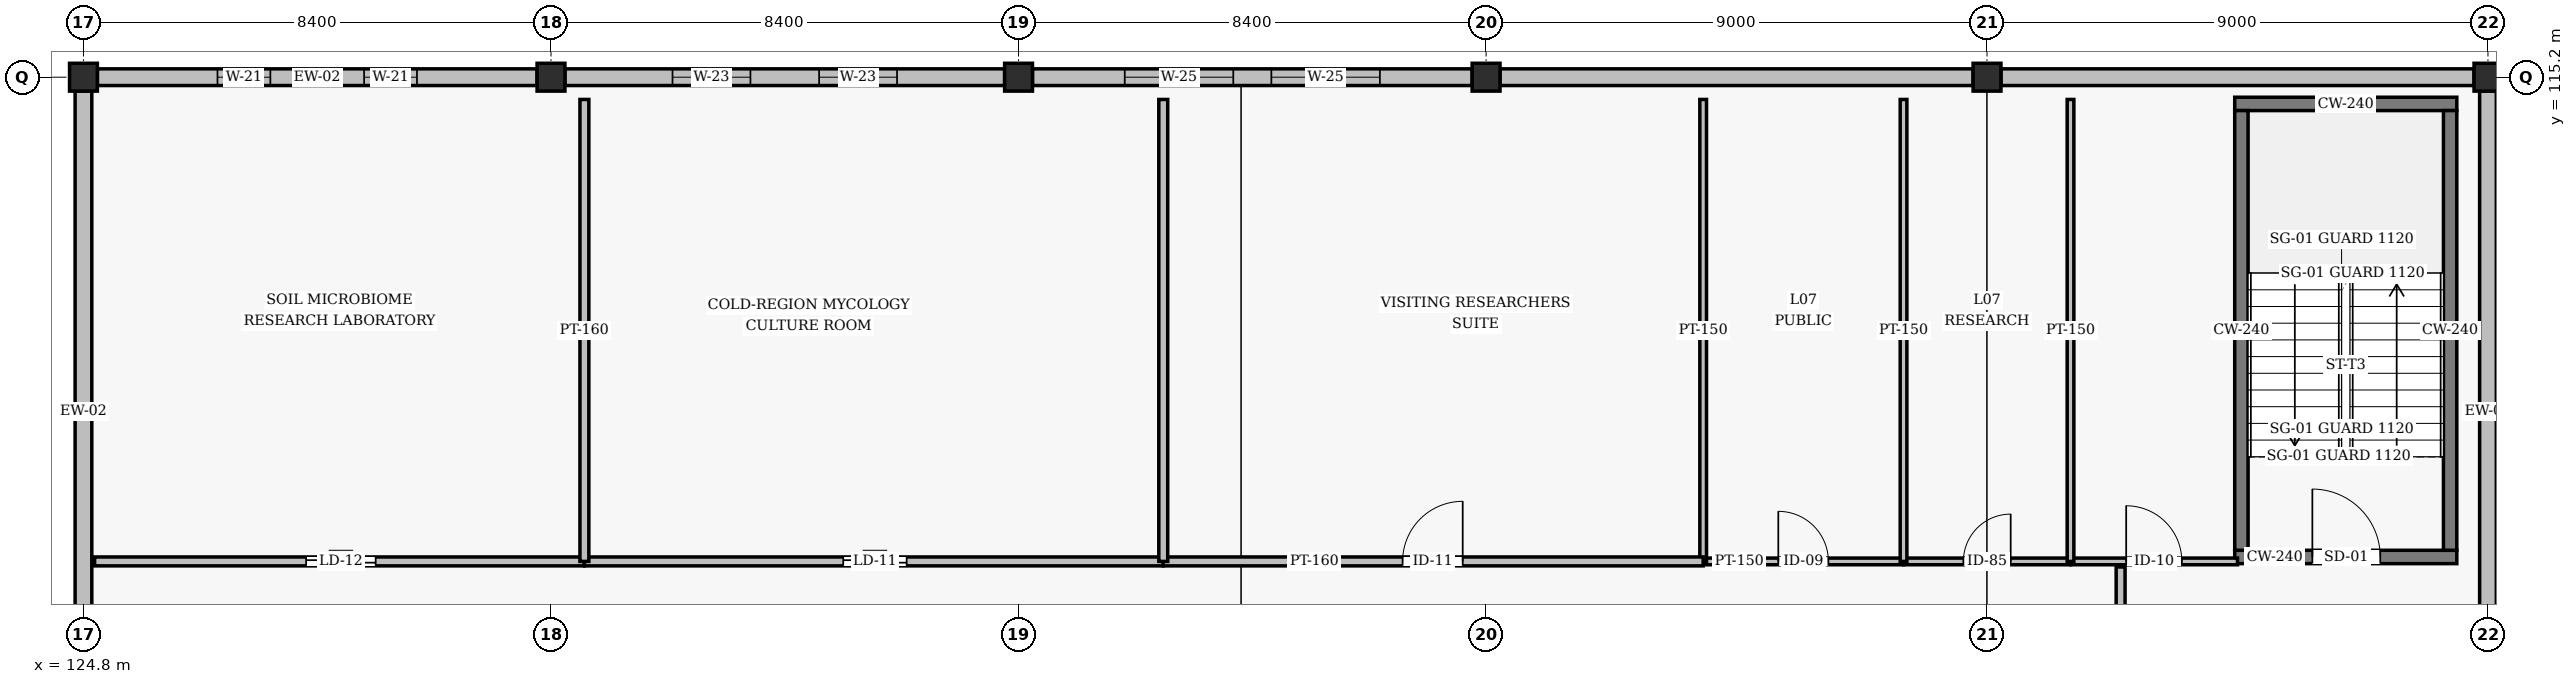
"""IFC4 building model, lengths in metres.
Left out: names, types, materials, properties, quantities, classifications, styles, units other than length and angle.
Written with IfcOpenShell. Run it as: python <this file> out.ifc"""

import sys

from ifc_helpers import new_model, si_unit, direction, frame, frame_2d, origin, origin_2d, place, context, subcontext, project, spatial, rectangle, hollow_rectangle, extrude, element, fill, save


model = new_model("IFC4")
c1 = context("Model", 3, precision=1e-05, world=origin(), true_north=direction((0.0, 1.0)))
c2 = subcontext(c1, "Body", "Model", "MODEL_VIEW")
j1 = project(units=[si_unit("LENGTHUNIT", "METRE"), si_unit("PLANEANGLEUNIT", "RADIAN")], contexts=[c1])
p1 = place(None, origin())
s1 = spatial("IfcSite", under=j1, at=p1, CompositionType="ELEMENT")
p2 = place(p1, origin())
s2 = spatial("IfcBuilding", under=s1, at=p2, CompositionType="ELEMENT")
p3 = place(p2, frame((0.0, 0.0, 28.2)))
s3 = spatial("IfcBuildingStorey", under=s2, at=p3, CompositionType="ELEMENT", Elevation=28.2)
for number, where, z_axis, x_axis in (
    (1, (124.8, 115.2, 0.0), (0.0, 0.0, 1.0), (1.0, 0.0, 0.0)),
    (2, (133.2, 115.2, 0.0), (0.0, 0.0, 1.0), (1.0, 0.0, 0.0)),
    (3, (141.6, 115.2, 0.0), (0.0, 0.0, 1.0), (1.0, 0.0, 0.0)),
    (4, (150.0, 115.2, 0.0), (0.0, 0.0, 1.0), (1.0, 0.0, 0.0)),
    (5, (159.0, 115.2, 0.0), (0.0, 0.0, 1.0), (1.0, 0.0, 0.0)),
    (6, (168.0, 115.2, 0.0), (0.0, 0.0, 1.0), (1.0, 0.0, 0.0)),
):
    element("IfcColumn", number, at=place(p3, frame(where, z_axis=z_axis, x_axis=x_axis)), inside=s3, PredefinedType="COLUMN", context=c2, shape_type="SweptSolid", body=[
        extrude(hollow_rectangle(XDim=0.5, YDim=0.5, WallThickness=0.02, InnerFilletRadius=0.02, OuterFilletRadius=0.04, at=origin_2d()), origin(), (0.0, 0.0, 1.0), 3.6),
    ])
p4 = place(p3, frame((168.0, 103.45, 0.0), z_axis=(0.0, 0.0, 1.0), x_axis=(0.0, 1.0, 0.0)))
e7 = element("IfcWall", 7, at=p4, inside=s3, PredefinedType="SOLIDWALL", context=c2, shape_type="SweptSolid", body=[
    extrude(rectangle(XDim=11.5, YDim=0.3, at=frame_2d((5.75, 0.0))), origin(), (0.0, 0.0, 1.0), 2.56),
])
for number, where, z_axis, x_axis in (
    (8, (167.75, 115.2, 0.0), (0.0, 0.0, 1.0), (-1.0, 0.0, 0.0)),
    (9, (158.75, 115.2, 0.0), (0.0, 0.0, 1.0), (-1.0, 0.0, 0.0)),
):
    element("IfcWall", number, at=place(p3, frame(where, z_axis=z_axis, x_axis=x_axis)), inside=s3, PredefinedType="SOLIDWALL", context=c2, shape_type="SweptSolid", body=[
        extrude(rectangle(XDim=8.5, YDim=0.3, at=frame_2d((4.25, 0.0))), origin(), (0.0, 0.0, 1.0), 2.56),
    ])
p5 = place(p3, frame((149.75, 115.2, 0.0), z_axis=(0.0, 0.0, 1.0), x_axis=(-1.0, 0.0, 0.0)))
e10 = element("IfcWall", 10, at=p5, inside=s3, PredefinedType="SOLIDWALL", context=c2, shape_type="SweptSolid", body=[
    extrude(rectangle(XDim=7.9, YDim=0.3, at=frame_2d((3.95, 0.0))), origin(), (0.0, 0.0, 1.0), 2.852),
])
p6 = place(p5, frame((1.658, 0.0, 0.8)))
e11 = element("IfcOpeningElement", 11, at=p6, cuts=e10, PredefinedType="OPENING", context=c2, shape_type="SweptSolid", body=[
    extrude(rectangle(XDim=1.95, YDim=1.75, at=frame_2d((0.975, 0.875))), frame((0.0, 0.16, 0.0), z_axis=(0.0, -1.0, 0.0), x_axis=(1.0, 0.0, 0.0)), (0.0, 0.0, 1.0), 0.32),
])
p7 = place(p5, frame((4.292, 0.0, 0.8)))
e12 = element("IfcOpeningElement", 12, at=p7, cuts=e10, PredefinedType="OPENING", context=c2, shape_type="SweptSolid", body=[
    extrude(rectangle(XDim=1.95, YDim=1.75, at=frame_2d((0.975, 0.875))), frame((0.0, 0.16, 0.0), z_axis=(0.0, -1.0, 0.0), x_axis=(1.0, 0.0, 0.0)), (0.0, 0.0, 1.0), 0.32),
])
p8 = place(p3, frame((141.35, 115.2, 0.0), z_axis=(0.0, 0.0, 1.0), x_axis=(-1.0, 0.0, 0.0)))
e13 = element("IfcWall", 13, at=p8, inside=s3, PredefinedType="SOLIDWALL", context=c2, shape_type="SweptSolid", body=[
    extrude(rectangle(XDim=7.9, YDim=0.3, at=frame_2d((3.95, 0.0))), origin(), (0.0, 0.0, 1.0), 2.852),
])
p9 = place(p8, frame((1.933, 0.0, 0.85)))
e14 = element("IfcOpeningElement", 14, at=p9, cuts=e13, PredefinedType="OPENING", context=c2, shape_type="SweptSolid", body=[
    extrude(rectangle(XDim=1.4, YDim=1.7, at=frame_2d((0.7, 0.85))), frame((0.0, 0.16, 0.0), z_axis=(0.0, -1.0, 0.0), x_axis=(1.0, 0.0, 0.0)), (0.0, 0.0, 1.0), 0.32),
])
p10 = place(p8, frame((4.567, 0.0, 0.85)))
e15 = element("IfcOpeningElement", 15, at=p10, cuts=e13, PredefinedType="OPENING", context=c2, shape_type="SweptSolid", body=[
    extrude(rectangle(XDim=1.4, YDim=1.7, at=frame_2d((0.7, 0.85))), frame((0.0, 0.16, 0.0), z_axis=(0.0, -1.0, 0.0), x_axis=(1.0, 0.0, 0.0)), (0.0, 0.0, 1.0), 0.32),
])
p11 = place(p3, frame((132.95, 115.2, 0.0), z_axis=(0.0, 0.0, 1.0), x_axis=(-1.0, 0.0, 0.0)))
e16 = element("IfcWall", 16, at=p11, inside=s3, PredefinedType="SOLIDWALL", context=c2, shape_type="SweptSolid", body=[
    extrude(rectangle(XDim=7.9, YDim=0.3, at=frame_2d((3.95, 0.0))), origin(), (0.0, 0.0, 1.0), 2.852),
])
p12 = place(p11, frame((2.158, 0.0, 0.95)))
e17 = element("IfcOpeningElement", 17, at=p12, cuts=e16, PredefinedType="OPENING", context=c2, shape_type="SweptSolid", body=[
    extrude(rectangle(XDim=0.95, YDim=1.6, at=frame_2d((0.475, 0.8))), frame((0.0, 0.16, 0.0), z_axis=(0.0, -1.0, 0.0), x_axis=(1.0, 0.0, 0.0)), (0.0, 0.0, 1.0), 0.32),
])
p13 = place(p11, frame((4.792, 0.0, 0.95)))
e18 = element("IfcOpeningElement", 18, at=p13, cuts=e16, PredefinedType="OPENING", context=c2, shape_type="SweptSolid", body=[
    extrude(rectangle(XDim=0.95, YDim=1.6, at=frame_2d((0.475, 0.8))), frame((0.0, 0.16, 0.0), z_axis=(0.0, -1.0, 0.0), x_axis=(1.0, 0.0, 0.0)), (0.0, 0.0, 1.0), 0.32),
])
p14 = place(p3, frame((124.8, 114.95, 0.0), z_axis=(0.0, 0.0, 1.0), x_axis=(0.0, -1.0, 0.0)))
e19 = element("IfcWall", 19, at=p14, inside=s3, PredefinedType="SOLIDWALL", context=c2, shape_type="SweptSolid", body=[
    extrude(rectangle(XDim=11.5, YDim=0.3, at=frame_2d((5.75, 0.0))), origin(), (0.0, 0.0, 1.0), 2.56),
])
p15 = place(p3, frame((163.45, 106.58, 0.0), z_axis=(0.0, 0.0, 1.0), x_axis=(1.0, 0.0, 0.0)))
e20 = element("IfcWall", 20, at=p15, inside=s3, PredefinedType="SHEAR", context=c2, shape_type="SweptSolid", body=[
    extrude(rectangle(XDim=3.99, YDim=0.24, at=frame_2d((1.995, 0.0))), origin(), (0.0, 0.0, 1.0), 3.352),
])
p16 = place(p15, frame((1.395, 0.0, 0.0)))
e21 = element("IfcOpeningElement", 21, at=p16, cuts=e20, PredefinedType="OPENING", context=c2, shape_type="SweptSolid", body=[
    extrude(rectangle(XDim=1.22, YDim=2.18, at=frame_2d((0.61, 1.09))), frame((0.0, 0.13, 0.0), z_axis=(0.0, -1.0, 0.0), x_axis=(1.0, 0.0, 0.0)), (0.0, 0.0, 1.0), 0.26),
])
p17 = place(p3, frame((163.45, 114.72, 0.0), z_axis=(0.0, 0.0, 1.0), x_axis=(1.0, 0.0, 0.0)))
e22 = element("IfcWall", 22, at=p17, inside=s3, PredefinedType="SHEAR", context=c2, shape_type="SweptSolid", body=[
    extrude(rectangle(XDim=3.99, YDim=0.24, at=frame_2d((1.995, 0.0))), origin(), (0.0, 0.0, 1.0), 3.352),
])
for number, where, z_axis, x_axis in (
    (23, (163.57, 106.7, 0.0), (0.0, 0.0, 1.0), (0.0, 1.0, 0.0)),
    (24, (167.32, 106.7, 0.0), (0.0, 0.0, 1.0), (0.0, 1.0, 0.0)),
):
    element("IfcWall", number, at=place(p3, frame(where, z_axis=z_axis, x_axis=x_axis)), inside=s3, PredefinedType="SHEAR", context=c2, shape_type="SweptSolid", body=[
        extrude(rectangle(XDim=7.9, YDim=0.24, at=frame_2d((3.95, 0.0))), origin(), (0.0, 0.0, 1.0), 3.352),
    ])
p18 = place(p3, frame((153.9, 106.5, 0.0), z_axis=(0.0, 0.0, 1.0), x_axis=(1.0, 0.0, 0.0)))
e25 = element("IfcWall", 25, at=p18, inside=s3, PredefinedType="PARTITIONING", context=c2, shape_type="SweptSolid", body=[
    extrude(rectangle(XDim=3.6, YDim=0.12, at=frame_2d((1.8, 0.0))), origin(), (0.0, 0.0, 1.0), 3.352),
])
p19 = place(p18, frame((1.35, 0.0, 0.0)))
e26 = element("IfcOpeningElement", 26, at=p19, cuts=e25, PredefinedType="OPENING", context=c2, shape_type="SweptSolid", body=[
    extrude(rectangle(XDim=0.9, YDim=2.1, at=frame_2d((0.45, 1.05))), frame((0.0, 0.07, 0.0), z_axis=(0.0, -1.0, 0.0), x_axis=(1.0, 0.0, 0.0)), (0.0, 0.0, 1.0), 0.14),
])
p20 = place(p3, frame((157.5, 106.5, 0.0), z_axis=(0.0, 0.0, 1.0), x_axis=(1.0, 0.0, 0.0)))
e27 = element("IfcWall", 27, at=p20, inside=s3, PredefinedType="PARTITIONING", context=c2, shape_type="SweptSolid", body=[
    extrude(rectangle(XDim=3.0, YDim=0.12, at=frame_2d((1.5, 0.0))), origin(), (0.0, 0.0, 1.0), 2.652),
])
p21 = place(p20, frame((1.075, 0.0, 0.0)))
e28 = element("IfcOpeningElement", 28, at=p21, cuts=e27, PredefinedType="OPENING", context=c2, shape_type="SweptSolid", body=[
    extrude(rectangle(XDim=0.85, YDim=2.1, at=frame_2d((0.425, 1.05))), frame((0.0, 0.07, 0.0), z_axis=(0.0, -1.0, 0.0), x_axis=(1.0, 0.0, 0.0)), (0.0, 0.0, 1.0), 0.14),
])
p22 = place(p3, frame((160.5, 106.5, 0.0), z_axis=(0.0, 0.0, 1.0), x_axis=(1.0, 0.0, 0.0)))
e29 = element("IfcWall", 29, at=p22, inside=s3, PredefinedType="PARTITIONING", context=c2, shape_type="SweptSolid", body=[
    extrude(rectangle(XDim=3.0, YDim=0.12, at=frame_2d((1.5, 0.0))), origin(), (0.0, 0.0, 1.0), 3.352),
])
p23 = place(p22, frame((1.0, 0.0, 0.0)))
e30 = element("IfcOpeningElement", 30, at=p23, cuts=e29, PredefinedType="OPENING", context=c2, shape_type="SweptSolid", body=[
    extrude(rectangle(XDim=1.0, YDim=2.1, at=frame_2d((0.5, 1.05))), frame((0.0, 0.07, 0.0), z_axis=(0.0, -1.0, 0.0), x_axis=(1.0, 0.0, 0.0)), (0.0, 0.0, 1.0), 0.14),
])
for number, where, z_axis, x_axis in (
    (31, (153.9, 106.5, 0.0), (0.0, 0.0, 1.0), (0.0, 1.0, 0.0)),
    (32, (157.5, 106.5, 0.0), (0.0, 0.0, 1.0), (0.0, 1.0, 0.0)),
):
    element("IfcWall", number, at=place(p3, frame(where, z_axis=z_axis, x_axis=x_axis)), inside=s3, PredefinedType="PARTITIONING", context=c2, shape_type="SweptSolid", body=[
        extrude(rectangle(XDim=8.3, YDim=0.12, at=frame_2d((4.15, 0.0))), origin(), (0.0, 0.0, 1.0), 2.956),
    ])
p24 = place(p3, frame((160.5, 106.5, 0.0), z_axis=(0.0, 0.0, 1.0), x_axis=(0.0, 1.0, 0.0)))
e33 = element("IfcWall", 33, at=p24, inside=s3, PredefinedType="PARTITIONING", context=c2, shape_type="SweptSolid", body=[
    extrude(rectangle(XDim=8.3, YDim=0.12, at=frame_2d((4.15, 0.0))), origin(), (0.0, 0.0, 1.0), 3.352),
])
p25 = place(p3, frame((161.4, 92.3, 0.0), z_axis=(0.0, 0.0, 1.0), x_axis=(0.0, 1.0, 0.0)))
e34 = element("IfcWall", 34, at=p25, inside=s3, PredefinedType="PARTITIONING", context=c2, shape_type="SweptSolid", body=[
    extrude(rectangle(XDim=14.1, YDim=0.16, at=frame_2d((7.05, 0.0))), origin(), (0.0, 0.0, 1.0), 2.752),
])
p26 = place(p25, frame((6.5, 0.0, 0.0)))
e35 = element("IfcOpeningElement", 35, at=p26, cuts=e34, PredefinedType="OPENING", context=c2, shape_type="SweptSolid", body=[
    extrude(rectangle(XDim=1.08, YDim=2.08, at=frame_2d((0.54, 1.04))), frame((0.0, 0.09, 0.0), z_axis=(0.0, -1.0, 0.0), x_axis=(1.0, 0.0, 0.0)), (0.0, 0.0, 1.0), 0.18),
])
p27 = place(p3, frame((125.0, 106.5, 0.0), z_axis=(0.0, 0.0, 1.0), x_axis=(1.0, 0.0, 0.0)))
e36 = element("IfcWall", 36, at=p27, inside=s3, PredefinedType="PARTITIONING", context=c2, shape_type="SweptSolid", body=[
    extrude(rectangle(XDim=8.8, YDim=0.16, at=frame_2d((4.4, 0.0))), origin(), (0.0, 0.0, 1.0), 2.652),
])
p28 = place(p27, frame((3.8, 0.0, 0.0)))
e37 = element("IfcOpeningElement", 37, at=p28, cuts=e36, PredefinedType="OPENING", context=c2, shape_type="SweptSolid", body=[
    extrude(rectangle(XDim=1.25, YDim=2.12, at=frame_2d((0.625, 1.06))), frame((0.0, 0.09, 0.0), z_axis=(0.0, -1.0, 0.0), x_axis=(1.0, 0.0, 0.0)), (0.0, 0.0, 1.0), 0.18),
])
p29 = place(p3, frame((133.8, 106.5, 0.0), z_axis=(0.0, 0.0, 1.0), x_axis=(1.0, 0.0, 0.0)))
e38 = element("IfcWall", 38, at=p29, inside=s3, PredefinedType="PARTITIONING", context=c2, shape_type="SweptSolid", body=[
    extrude(rectangle(XDim=10.4, YDim=0.16, at=frame_2d((5.2, 0.0))), origin(), (0.0, 0.0, 1.0), 2.652),
])
p30 = place(p29, frame((4.65, 0.0, 0.0)))
e39 = element("IfcOpeningElement", 39, at=p30, cuts=e38, PredefinedType="OPENING", context=c2, shape_type="SweptSolid", body=[
    extrude(rectangle(XDim=1.14, YDim=2.12, at=frame_2d((0.57, 1.06))), frame((0.0, 0.09, 0.0), z_axis=(0.0, -1.0, 0.0), x_axis=(1.0, 0.0, 0.0)), (0.0, 0.0, 1.0), 0.18),
])
p31 = place(p3, frame((144.2, 106.5, 0.0), z_axis=(0.0, 0.0, 1.0), x_axis=(1.0, 0.0, 0.0)))
e40 = element("IfcWall", 40, at=p31, inside=s3, PredefinedType="PARTITIONING", context=c2, shape_type="SweptSolid", body=[
    extrude(rectangle(XDim=9.7, YDim=0.16, at=frame_2d((4.85, 0.0))), origin(), (0.0, 0.0, 1.0), 2.652),
])
p32 = place(p31, frame((4.3, 0.0, 0.0)))
e41 = element("IfcOpeningElement", 41, at=p32, cuts=e40, PredefinedType="OPENING", context=c2, shape_type="SweptSolid", body=[
    extrude(rectangle(XDim=1.08, YDim=2.08, at=frame_2d((0.54, 1.04))), frame((0.0, 0.09, 0.0), z_axis=(0.0, -1.0, 0.0), x_axis=(1.0, 0.0, 0.0)), (0.0, 0.0, 1.0), 0.18),
])
for number, where, z_axis, x_axis in (
    (42, (133.8, 106.5, 0.0), (0.0, 0.0, 1.0), (0.0, 1.0, 0.0)),
    (43, (144.2, 106.5, 0.0), (0.0, 0.0, 1.0), (0.0, 1.0, 0.0)),
):
    element("IfcWall", number, at=place(p3, frame(where, z_axis=z_axis, x_axis=x_axis)), inside=s3, PredefinedType="PARTITIONING", context=c2, shape_type="SweptSolid", body=[
        extrude(rectangle(XDim=8.3, YDim=0.16, at=frame_2d((4.15, 0.0))), origin(), (0.0, 0.0, 1.0), 3.006),
    ])
p33 = place(p6, origin())
e44 = element("IfcWindow", 44, at=p33, inside=s3, PartitioningType="SINGLE_PANEL", PredefinedType="WINDOW", context=c2, shape_type="SweptSolid", body=[
    extrude(rectangle(XDim=1.95, YDim=1.75, at=frame_2d((0.975, 0.875))), frame((0.0, 0.03, 0.0), z_axis=(0.0, -1.0, 0.0), x_axis=(1.0, 0.0, 0.0)), (0.0, 0.0, 1.0), 0.06),
])
fill(e11, e44)
p34 = place(p7, origin())
e45 = element("IfcWindow", 45, at=p34, inside=s3, PartitioningType="SINGLE_PANEL", PredefinedType="WINDOW", context=c2, shape_type="SweptSolid", body=[
    extrude(rectangle(XDim=1.95, YDim=1.75, at=frame_2d((0.975, 0.875))), frame((0.0, 0.03, 0.0), z_axis=(0.0, -1.0, 0.0), x_axis=(1.0, 0.0, 0.0)), (0.0, 0.0, 1.0), 0.06),
])
fill(e12, e45)
p35 = place(p9, origin())
e46 = element("IfcWindow", 46, at=p35, inside=s3, PartitioningType="SINGLE_PANEL", PredefinedType="WINDOW", context=c2, shape_type="SweptSolid", body=[
    extrude(rectangle(XDim=1.4, YDim=1.7, at=frame_2d((0.7, 0.85))), frame((0.0, 0.03, 0.0), z_axis=(0.0, -1.0, 0.0), x_axis=(1.0, 0.0, 0.0)), (0.0, 0.0, 1.0), 0.06),
])
fill(e14, e46)
p36 = place(p10, origin())
e47 = element("IfcWindow", 47, at=p36, inside=s3, PartitioningType="SINGLE_PANEL", PredefinedType="WINDOW", context=c2, shape_type="SweptSolid", body=[
    extrude(rectangle(XDim=1.4, YDim=1.7, at=frame_2d((0.7, 0.85))), frame((0.0, 0.03, 0.0), z_axis=(0.0, -1.0, 0.0), x_axis=(1.0, 0.0, 0.0)), (0.0, 0.0, 1.0), 0.06),
])
fill(e15, e47)
p37 = place(p12, origin())
e48 = element("IfcWindow", 48, at=p37, inside=s3, PartitioningType="SINGLE_PANEL", PredefinedType="WINDOW", context=c2, shape_type="SweptSolid", body=[
    extrude(rectangle(XDim=0.95, YDim=1.6, at=frame_2d((0.475, 0.8))), frame((0.0, 0.03, 0.0), z_axis=(0.0, -1.0, 0.0), x_axis=(1.0, 0.0, 0.0)), (0.0, 0.0, 1.0), 0.06),
])
fill(e17, e48)
p38 = place(p13, origin())
e49 = element("IfcWindow", 49, at=p38, inside=s3, PartitioningType="SINGLE_PANEL", PredefinedType="WINDOW", context=c2, shape_type="SweptSolid", body=[
    extrude(rectangle(XDim=0.95, YDim=1.6, at=frame_2d((0.475, 0.8))), frame((0.0, 0.03, 0.0), z_axis=(0.0, -1.0, 0.0), x_axis=(1.0, 0.0, 0.0)), (0.0, 0.0, 1.0), 0.06),
])
fill(e18, e49)
p39 = place(p16, origin())
e50 = element("IfcDoor", 50, at=p39, inside=s3, OperationType="SINGLE_SWING_LEFT", PredefinedType="DOOR", context=c2, shape_type="SweptSolid", body=[
    extrude(rectangle(XDim=1.22, YDim=2.18, at=frame_2d((0.61, 1.09))), frame((0.0, 0.025, 0.0), z_axis=(0.0, -1.0, 0.0), x_axis=(1.0, 0.0, 0.0)), (0.0, 0.0, 1.0), 0.05),
])
fill(e21, e50)
p40 = place(p19, origin())
e51 = element("IfcDoor", 51, at=p40, inside=s3, OperationType="SINGLE_SWING_LEFT", PredefinedType="DOOR", context=c2, shape_type="SweptSolid", body=[
    extrude(rectangle(XDim=0.9, YDim=2.1, at=frame_2d((0.45, 1.05))), frame((0.0, 0.025, 0.0), z_axis=(0.0, -1.0, 0.0), x_axis=(1.0, 0.0, 0.0)), (0.0, 0.0, 1.0), 0.05),
])
fill(e26, e51)
p41 = place(p21, origin())
e52 = element("IfcDoor", 52, at=p41, inside=s3, OperationType="SINGLE_SWING_RIGHT", PredefinedType="DOOR", context=c2, shape_type="SweptSolid", body=[
    extrude(rectangle(XDim=0.85, YDim=2.1, at=frame_2d((0.425, 1.05))), frame((0.0, 0.025, 0.0), z_axis=(0.0, -1.0, 0.0), x_axis=(1.0, 0.0, 0.0)), (0.0, 0.0, 1.0), 0.05),
])
fill(e28, e52)
p42 = place(p23, origin())
e53 = element("IfcDoor", 53, at=p42, inside=s3, OperationType="SINGLE_SWING_LEFT", PredefinedType="DOOR", context=c2, shape_type="SweptSolid", body=[
    extrude(rectangle(XDim=1.0, YDim=2.1, at=frame_2d((0.5, 1.05))), frame((0.0, 0.025, 0.0), z_axis=(0.0, -1.0, 0.0), x_axis=(1.0, 0.0, 0.0)), (0.0, 0.0, 1.0), 0.05),
])
fill(e30, e53)
p43 = place(p28, origin())
e54 = element("IfcDoor", 54, at=p43, inside=s3, OperationType="SINGLE_SWING_LEFT", PredefinedType="DOOR", context=c2, shape_type="SweptSolid", body=[
    extrude(rectangle(XDim=1.25, YDim=2.12, at=frame_2d((0.625, 1.06))), frame((0.0, 0.025, 0.0), z_axis=(0.0, -1.0, 0.0), x_axis=(1.0, 0.0, 0.0)), (0.0, 0.0, 1.0), 0.05),
])
fill(e37, e54)
p44 = place(p30, origin())
e55 = element("IfcDoor", 55, at=p44, inside=s3, OperationType="SINGLE_SWING_RIGHT", PredefinedType="DOOR", context=c2, shape_type="SweptSolid", body=[
    extrude(rectangle(XDim=1.14, YDim=2.12, at=frame_2d((0.57, 1.06))), frame((0.0, 0.025, 0.0), z_axis=(0.0, -1.0, 0.0), x_axis=(1.0, 0.0, 0.0)), (0.0, 0.0, 1.0), 0.05),
])
fill(e39, e55)
p45 = place(p32, origin())
e56 = element("IfcDoor", 56, at=p45, inside=s3, OperationType="SINGLE_SWING_RIGHT", PredefinedType="DOOR", context=c2, shape_type="SweptSolid", body=[
    extrude(rectangle(XDim=1.08, YDim=2.08, at=frame_2d((0.54, 1.04))), frame((0.0, 0.025, 0.0), z_axis=(0.0, -1.0, 0.0), x_axis=(1.0, 0.0, 0.0)), (0.0, 0.0, 1.0), 0.05),
])
fill(e41, e56)
save(model, sys.argv[1])
